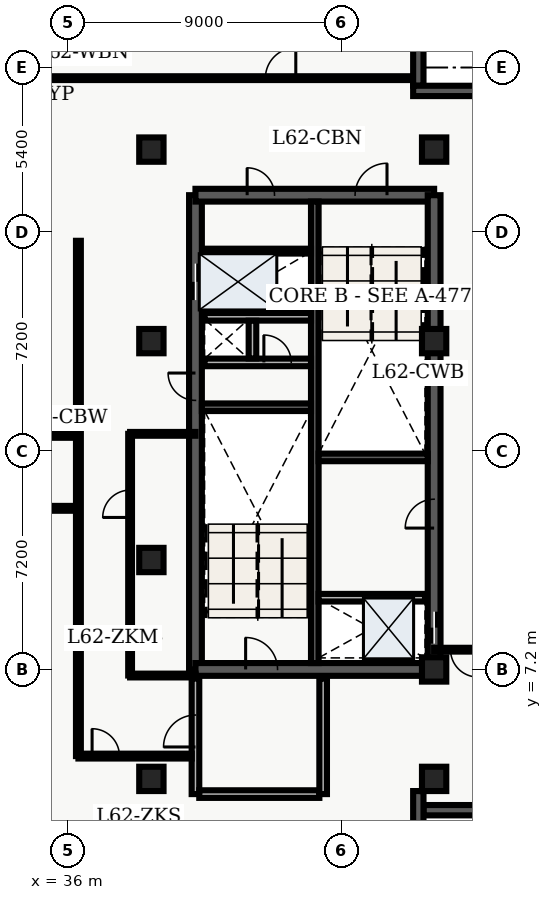
"""IFC4 building model, lengths in metres.
Left out: names, types, materials, properties, quantities, classifications, styles, units other than length and angle.
Written with IfcOpenShell. Run it as: python <this file> out.ifc"""

import sys

from ifc_helpers import new_model, entity, si_unit, converted_unit, direction, frame, origin_with_axes, origin_2d_with_axis, place, context, subcontext, project, spatial, polyline, rectangle, outline, extrude, element, fill, save


model = new_model("IFC4")
c1 = context("Model", 3, precision=1e-05, world=origin_with_axes(), true_north=direction((0.0, 1.0)))
c2 = subcontext(c1, "Body", "Model", "MODEL_VIEW")
j1 = project(units=[si_unit("LENGTHUNIT", "METRE"), converted_unit("PLANEANGLEUNIT", "DEGREE", entity("IfcPlaneAngleMeasure", 0.017), si_unit("PLANEANGLEUNIT", "RADIAN"), dimensions=[0, 0, 0, 0, 0, 0, 0])], contexts=[c1])
p1 = place(None, origin_with_axes())
s1 = spatial("IfcSite", under=j1, at=p1, CompositionType="ELEMENT")
p2 = place(p1, origin_with_axes())
s2 = spatial("IfcBuilding", under=s1, at=p2, CompositionType="ELEMENT")
p3 = place(p2, frame((0.0, 0.0, 252.9), z_axis=(0.0, 0.0, 1.0), x_axis=(1.0, 0.0, 0.0)))
s3 = spatial("IfcBuildingStorey", under=s2, at=p3, CompositionType="ELEMENT", Elevation=252.9)
p4 = place(p3, frame((40.2, 7.2, 0.0), z_axis=(0.0, 0.0, 1.0), x_axis=(0.0, 1.0, 0.0)))
e1 = element("IfcWall", 1, at=p4, inside=s3, PredefinedType="SHEAR", context=c2, shape_type="SweptSolid", body=[
    extrude(outline(polyline([(0.0, -0.21), (15.6, -0.21), (15.6, 0.21), (0.0, 0.21), (0.0, -0.21)])), origin_with_axes(), (0.0, 0.0, 1.0), 3.66),
])
p5 = place(p4, frame((12.75, 0.0, 0.0), z_axis=(0.0, 0.0, 1.0), x_axis=(1.0, 0.0, 0.0)))
e2 = element("IfcOpeningElement", 2, at=p5, cuts=e1, PredefinedType="OPENING", context=c2, shape_type="SweptSolid", body=[
    extrude(rectangle(XDim=1.2, YDim=0.44, at=origin_2d_with_axis()), origin_with_axes(), (0.0, 0.0, 1.0), 2.15),
])
p6 = place(p4, frame((9.3, 0.0, 0.0), z_axis=(0.0, 0.0, 1.0), x_axis=(1.0, 0.0, 0.0)))
e3 = element("IfcOpeningElement", 3, at=p6, cuts=e1, PredefinedType="OPENING", context=c2, shape_type="SweptSolid", body=[
    extrude(rectangle(XDim=0.9, YDim=0.44, at=origin_2d_with_axis()), origin_with_axes(), (0.0, 0.0, 1.0), 2.15),
])
p7 = place(p3, frame((40.2, 7.2, 0.0), z_axis=(0.0, 0.0, 1.0), x_axis=(1.0, 0.0, 0.0)))
e4 = element("IfcWall", 4, at=p7, inside=s3, PredefinedType="SHEAR", context=c2, shape_type="SweptSolid", body=[
    extrude(outline(polyline([(0.0, -0.21), (7.85, -0.21), (7.85, 0.21), (0.0, 0.21), (0.0, -0.21)])), origin_with_axes(), (0.0, 0.0, 1.0), 3.66),
])
p8 = place(p7, frame((2.175, 0.0, 0.0), z_axis=(0.0, 0.0, 1.0), x_axis=(1.0, 0.0, 0.0)))
e5 = element("IfcOpeningElement", 5, at=p8, cuts=e4, PredefinedType="OPENING", context=c2, shape_type="SweptSolid", body=[
    extrude(rectangle(XDim=1.05, YDim=0.44, at=origin_2d_with_axis()), origin_with_axes(), (0.0, 0.0, 1.0), 2.15),
])
p9 = place(p3, frame((40.2, 22.8, 0.0), z_axis=(0.0, 0.0, 1.0), x_axis=(1.0, 0.0, 0.0)))
e6 = element("IfcWall", 6, at=p9, inside=s3, PredefinedType="SHEAR", context=c2, shape_type="SweptSolid", body=[
    extrude(outline(polyline([(0.0, -0.21), (7.85, -0.21), (7.85, 0.21), (0.0, 0.21), (0.0, -0.21)])), origin_with_axes(), (0.0, 0.0, 1.0), 3.66),
])
p10 = place(p9, frame((5.775, 0.0, 0.0), z_axis=(0.0, 0.0, 1.0), x_axis=(1.0, 0.0, 0.0)))
e7 = element("IfcOpeningElement", 7, at=p10, cuts=e6, PredefinedType="OPENING", context=c2, shape_type="SweptSolid", body=[
    extrude(rectangle(XDim=1.05, YDim=0.44, at=origin_2d_with_axis()), origin_with_axes(), (0.0, 0.0, 1.0), 2.15),
])
p11 = place(p9, frame((2.15, 0.0, 0.0), z_axis=(0.0, 0.0, 1.0), x_axis=(1.0, 0.0, 0.0)))
e8 = element("IfcOpeningElement", 8, at=p11, cuts=e6, PredefinedType="OPENING", context=c2, shape_type="SweptSolid", body=[
    extrude(rectangle(XDim=0.9, YDim=0.44, at=origin_2d_with_axis()), origin_with_axes(), (0.0, 0.0, 1.0), 2.15),
])
p12 = place(p3, frame((48.05, 7.2, 0.0), z_axis=(0.0, 0.0, 1.0), x_axis=(0.0, 1.0, 0.0)))
e9 = element("IfcWall", 9, at=p12, inside=s3, PredefinedType="SHEAR", context=c2, shape_type="SweptSolid", body=[
    extrude(outline(polyline([(0.0, -0.21), (15.6, -0.21), (15.6, 0.21), (0.0, 0.21), (0.0, -0.21)])), origin_with_axes(), (0.0, 0.0, 1.0), 3.66),
])
p13 = place(p12, frame((1.375, 0.0, 0.0), z_axis=(0.0, 0.0, 1.0), x_axis=(1.0, 0.0, 0.0)))
e10 = element("IfcOpeningElement", 10, at=p13, cuts=e9, PredefinedType="OPENING", context=c2, shape_type="SweptSolid", body=[
    extrude(rectangle(XDim=1.05, YDim=0.44, at=origin_2d_with_axis()), origin_with_axes(), (0.0, 0.0, 1.0), 2.15),
])
p14 = place(p12, frame((5.125, 0.0, 0.0), z_axis=(0.0, 0.0, 1.0), x_axis=(1.0, 0.0, 0.0)))
e11 = element("IfcOpeningElement", 11, at=p14, cuts=e9, PredefinedType="OPENING", context=c2, shape_type="SweptSolid", body=[
    extrude(rectangle(XDim=0.95, YDim=0.44, at=origin_2d_with_axis()), origin_with_axes(), (0.0, 0.0, 1.0), 2.15),
])
p15 = place(p3, frame((44.125, 7.41, 0.0), z_axis=(0.0, 0.0, 1.0), x_axis=(0.0, 1.0, 0.0)))
e12 = element("IfcWall", 12, at=p15, inside=s3, PredefinedType="SHEAR", context=c2, shape_type="SweptSolid", body=[
    extrude(outline(polyline([(0.0, -0.125), (15.18, -0.125), (15.18, 0.125), (0.0, 0.125), (0.0, -0.125)])), origin_with_axes(), (0.0, 0.0, 1.0), 3.66),
])
for number, where, z_axis, x_axis in (
    (13, (40.41, 15.825, 0.0), (0.0, 0.0, 1.0), (1.0, 0.0, 0.0)),
    (14, (44.25, 14.175, 0.0), (0.0, 0.0, 1.0), (1.0, 0.0, 0.0)),
):
    element("IfcWall", number, at=place(p3, frame(where, z_axis=z_axis, x_axis=x_axis)), inside=s3, PredefinedType="SHEAR", context=c2, shape_type="SweptSolid", body=[
        extrude(outline(polyline([(0.0, -0.125), (3.59, -0.125), (3.59, 0.125), (0.0, 0.125), (0.0, -0.125)])), origin_with_axes(), (0.0, 0.0, 1.0), 3.66),
    ])
p16 = place(p3, frame((40.5, 17.3, 0.0), z_axis=(0.0, 0.0, 1.0), x_axis=(1.0, 0.0, 0.0)))
e15 = element("IfcWall", 15, at=p16, inside=s3, PredefinedType="SOLIDWALL", context=c2, shape_type="SweptSolid", body=[
    extrude(outline(polyline([(0.0, -0.125), (3.5, -0.125), (3.5, 0.125), (0.0, 0.125), (0.0, -0.125)])), origin_with_axes(), (0.0, 0.0, 1.0), 2.7),
])
p17 = place(p16, frame((2.4, 0.0, 0.0), z_axis=(0.0, 0.0, 1.0), x_axis=(1.0, 0.0, 0.0)))
e16 = element("IfcOpeningElement", 16, at=p17, cuts=e15, PredefinedType="OPENING", context=c2, shape_type="SweptSolid", body=[
    extrude(rectangle(XDim=0.9, YDim=0.27, at=origin_2d_with_axis()), origin_with_axes(), (0.0, 0.0, 1.0), 2.15),
])
p18 = place(p3, frame((40.5, 18.8, 0.0), z_axis=(0.0, 0.0, 1.0), x_axis=(1.0, 0.0, 0.0)))
e17 = element("IfcWall", 17, at=p18, inside=s3, PredefinedType="SOLIDWALL", context=c2, shape_type="SweptSolid", body=[
    extrude(outline(polyline([(0.0, -0.125), (3.5, -0.125), (3.5, 0.125), (0.0, 0.125), (0.0, -0.125)])), origin_with_axes(), (0.0, 0.0, 1.0), 2.7),
])
p19 = place(p3, frame((42.075, 17.43, 0.0), z_axis=(0.0, 0.0, 1.0), x_axis=(0.0, 1.0, 0.0)))
e18 = element("IfcWall", 18, at=p19, inside=s3, PredefinedType="SOLIDWALL", context=c2, shape_type="SweptSolid", body=[
    extrude(outline(polyline([(0.0, -0.125), (1.24, -0.125), (1.24, 0.125), (0.0, 0.125), (0.0, -0.125)])), origin_with_axes(), (0.0, 0.0, 1.0), 2.7),
])
p20 = place(p3, frame((40.2, 3.1, 0.0), z_axis=(0.0, 0.0, 1.0), x_axis=(0.0, 1.0, 0.0)))
e19 = element("IfcWall", 19, at=p20, inside=s3, PredefinedType="SOLIDWALL", context=c2, shape_type="SweptSolid", body=[
    extrude(outline(polyline([(0.0, -0.125), (3.8, -0.125), (3.8, 0.125), (0.0, 0.125), (0.0, -0.125)])), origin_with_axes(), (0.0, 0.0, 1.0), 2.7),
])
p21 = place(p20, frame((2.075, 0.0, 0.0), z_axis=(0.0, 0.0, 1.0), x_axis=(1.0, 0.0, 0.0)))
e20 = element("IfcOpeningElement", 20, at=p21, cuts=e19, PredefinedType="OPENING", context=c2, shape_type="SweptSolid", body=[
    extrude(rectangle(XDim=1.05, YDim=0.27, at=origin_2d_with_axis()), origin_with_axes(), (0.0, 0.0, 1.0), 2.15),
])
p22 = place(p3, frame((40.325, 3.1, 0.0), z_axis=(0.0, 0.0, 1.0), x_axis=(1.0, 0.0, 0.0)))
e21 = element("IfcWall", 21, at=p22, inside=s3, PredefinedType="SOLIDWALL", context=c2, shape_type="SweptSolid", body=[
    extrude(outline(polyline([(0.0, -0.125), (3.95, -0.125), (3.95, 0.125), (0.0, 0.125), (0.0, -0.125)])), origin_with_axes(), (0.0, 0.0, 1.0), 2.7),
])
p23 = place(p3, frame((44.4, 3.1, 0.0), z_axis=(0.0, 0.0, 1.0), x_axis=(0.0, 1.0, 0.0)))
e22 = element("IfcWall", 22, at=p23, inside=s3, PredefinedType="SOLIDWALL", context=c2, shape_type="SweptSolid", body=[
    extrude(outline(polyline([(0.0, -0.125), (3.8, -0.125), (3.8, 0.125), (0.0, 0.125), (0.0, -0.125)])), origin_with_axes(), (0.0, 0.0, 1.0), 2.7),
])
for number, where, z_axis, x_axis in (
    (23, (38.75, 3.6, 0.0), (0.0, 0.0, 1.0), (1.0, 0.0, 0.0)),
    (24, (38.75, 10.8, 0.0), (0.0, 0.0, 1.0), (1.0, 0.0, 0.0)),
    (25, (38.75, 18.0, 0.0), (0.0, 0.0, 1.0), (1.0, 0.0, 0.0)),
    (26, (38.75, 24.3, 0.0), (0.0, 0.0, 1.0), (1.0, 0.0, 0.0)),
    (27, (48.05, 3.6, 0.0), (0.0, 0.0, 1.0), (1.0, 0.0, 0.0)),
    (28, (48.05, 7.2, 0.0), (0.0, 0.0, 1.0), (1.0, 0.0, 0.0)),
    (29, (48.05, 18.0, 0.0), (0.0, 0.0, 1.0), (1.0, 0.0, 0.0)),
    (30, (48.05, 24.3, 0.0), (0.0, 0.0, 1.0), (1.0, 0.0, 0.0)),
):
    element("IfcColumn", number, at=place(p3, frame(where, z_axis=z_axis, x_axis=x_axis)), inside=s3, PredefinedType="COLUMN", context=c2, shape_type="SweptSolid", body=[
        extrude(rectangle(XDim=0.8, YDim=0.8, at=origin_2d_with_axis()), origin_with_axes(), (0.0, 0.0, 1.0), 3.9),
    ])
p24 = place(p3, frame((40.5, 20.96, 0.0), z_axis=(0.0, 0.0, 1.0), x_axis=(1.0, 0.0, 0.0)))
e31 = element("IfcWall", 31, at=p24, inside=s3, PredefinedType="PARTITIONING", context=c2, shape_type="SweptSolid", body=[
    extrude(outline(polyline([(0.0, -0.08), (3.5, -0.08), (3.5, 0.08), (0.0, 0.08), (0.0, -0.08)])), origin_with_axes(), (0.0, 0.0, 1.0), 2.7),
])
p25 = place(p3, frame((44.25, 9.56, 0.0), z_axis=(0.0, 0.0, 1.0), x_axis=(1.0, 0.0, 0.0)))
e32 = element("IfcWall", 32, at=p25, inside=s3, PredefinedType="SOLIDWALL", context=c2, shape_type="SweptSolid", body=[
    extrude(outline(polyline([(0.0, -0.125), (3.5, -0.125), (3.5, 0.125), (0.0, 0.125), (0.0, -0.125)])), origin_with_axes(), (0.0, 0.0, 1.0), 2.7),
])
p26 = place(p3, frame((20.3, 12.5, 0.0), z_axis=(0.0, 0.0, 1.0), x_axis=(1.0, 0.0, 0.0)))
e33 = element("IfcWall", 33, at=p26, inside=s3, PredefinedType="PARTITIONING", context=c2, shape_type="SweptSolid", body=[
    extrude(outline(polyline([(0.0, -0.08), (16.05, -0.08), (16.05, 0.08), (0.0, 0.08), (0.0, -0.08)])), origin_with_axes(), (0.0, 0.0, 1.0), 2.7),
])
p27 = place(p26, frame((3.662, 0.0, 0.0), z_axis=(0.0, 0.0, 1.0), x_axis=(1.0, 0.0, 0.0)))
e34 = element("IfcOpeningElement", 34, at=p27, cuts=e33, PredefinedType="OPENING", context=c2, shape_type="SweptSolid", body=[
    extrude(rectangle(XDim=1.0, YDim=0.18, at=origin_2d_with_axis()), origin_with_axes(), (0.0, 0.0, 1.0), 2.15),
])
p28 = place(p26, frame((11.557, 0.0, 0.0), z_axis=(0.0, 0.0, 1.0), x_axis=(1.0, 0.0, 0.0)))
e35 = element("IfcOpeningElement", 35, at=p28, cuts=e33, PredefinedType="OPENING", context=c2, shape_type="SweptSolid", body=[
    extrude(rectangle(XDim=1.0, YDim=0.18, at=origin_2d_with_axis()), origin_with_axes(), (0.0, 0.0, 1.0), 2.15),
])
p29 = place(p3, frame((20.3, 14.9, 0.0), z_axis=(0.0, 0.0, 1.0), x_axis=(1.0, 0.0, 0.0)))
e36 = element("IfcWall", 36, at=p29, inside=s3, PredefinedType="PARTITIONING", context=c2, shape_type="SweptSolid", body=[
    extrude(outline(polyline([(0.0, -0.08), (16.05, -0.08), (16.05, 0.08), (0.0, 0.08), (0.0, -0.08)])), origin_with_axes(), (0.0, 0.0, 1.0), 2.7),
])
p30 = place(p29, frame((3.759, 0.0, 0.0), z_axis=(0.0, 0.0, 1.0), x_axis=(1.0, 0.0, 0.0)))
e37 = element("IfcOpeningElement", 37, at=p30, cuts=e36, PredefinedType="OPENING", context=c2, shape_type="SweptSolid", body=[
    extrude(rectangle(XDim=1.0, YDim=0.18, at=origin_2d_with_axis()), origin_with_axes(), (0.0, 0.0, 1.0), 2.15),
])
p31 = place(p29, frame((11.654, 0.0, 0.0), z_axis=(0.0, 0.0, 1.0), x_axis=(1.0, 0.0, 0.0)))
e38 = element("IfcOpeningElement", 38, at=p31, cuts=e36, PredefinedType="OPENING", context=c2, shape_type="SweptSolid", body=[
    extrude(rectangle(XDim=1.0, YDim=0.18, at=origin_2d_with_axis()), origin_with_axes(), (0.0, 0.0, 1.0), 2.15),
])
p32 = place(p3, frame((36.35, 4.35, 0.0), z_axis=(0.0, 0.0, 1.0), x_axis=(0.0, 1.0, 0.0)))
e39 = element("IfcWall", 39, at=p32, inside=s3, PredefinedType="PARTITIONING", context=c2, shape_type="SweptSolid", body=[
    extrude(outline(polyline([(0.0, -0.08), (16.95, -0.08), (16.95, 0.08), (0.0, 0.08), (0.0, -0.08)])), origin_with_axes(), (0.0, 0.0, 1.0), 2.7),
])
p33 = place(p3, frame((49.765, 7.85, 0.0), z_axis=(0.0, 0.0, 1.0), x_axis=(-1.0, 0.0, 0.0)))
e40 = element("IfcWall", 40, at=p33, inside=s3, PredefinedType="PARTITIONING", context=c2, shape_type="SweptSolid", body=[
    extrude(outline(polyline([(0.0, -0.062), (1.715, -0.062), (1.715, 0.062), (0.0, 0.062), (0.0, -0.062)])), origin_with_axes(), (0.0, 0.0, 1.0), 2.7),
])
p34 = place(p33, frame((0.725, 0.0, 0.0), z_axis=(0.0, 0.0, 1.0), x_axis=(1.0, 0.0, 0.0)))
e41 = element("IfcOpeningElement", 41, at=p34, cuts=e40, PredefinedType="OPENING", context=c2, shape_type="SweptSolid", body=[
    extrude(rectangle(XDim=0.9, YDim=0.145, at=origin_2d_with_axis()), origin_with_axes(), (0.0, 0.0, 1.0), 2.15),
])
p35 = place(p3, frame((34.535, 26.65, 0.0), z_axis=(0.0, 0.0, 1.0), x_axis=(1.0, 0.0, 0.0)))
e42 = element("IfcWall", 42, at=p35, inside=s3, PredefinedType="PARTITIONING", context=c2, shape_type="SweptSolid", body=[
    extrude(outline(polyline([(0.0, -0.062), (12.995, -0.062), (12.995, 0.062), (0.0, 0.062), (0.0, -0.062)])), origin_with_axes(), (0.0, 0.0, 1.0), 2.7),
])
p36 = place(p35, frame((8.465, 0.0, 0.0), z_axis=(0.0, 0.0, 1.0), x_axis=(1.0, 0.0, 0.0)))
e43 = element("IfcOpeningElement", 43, at=p36, cuts=e42, PredefinedType="OPENING", context=c2, shape_type="SweptSolid", body=[
    extrude(rectangle(XDim=1.0, YDim=0.145, at=origin_2d_with_axis()), origin_with_axes(), (0.0, 0.0, 1.0), 2.15),
])
p37 = place(p3, frame((36.35, 4.35, 0.0), z_axis=(0.0, 0.0, 1.0), x_axis=(1.0, 0.0, 0.0)))
e44 = element("IfcWall", 44, at=p37, inside=s3, PredefinedType="PARTITIONING", context=c2, shape_type="SweptSolid", body=[
    extrude(outline(polyline([(0.0, -0.08), (3.725, -0.08), (3.725, 0.08), (0.0, 0.08), (0.0, -0.08)])), origin_with_axes(), (0.0, 0.0, 1.0), 2.7),
])
p38 = place(p37, frame((0.9, 0.0, 0.0), z_axis=(0.0, 0.0, 1.0), x_axis=(1.0, 0.0, 0.0)))
e45 = element("IfcOpeningElement", 45, at=p38, cuts=e44, PredefinedType="OPENING", context=c2, shape_type="SweptSolid", body=[
    extrude(rectangle(XDim=0.9, YDim=0.18, at=origin_2d_with_axis()), origin_with_axes(), (0.0, 0.0, 1.0), 2.15),
])
for number, where, z_axis, x_axis in (
    (46, (38.05, 7.0, 0.0), (0.0, 0.0, 1.0), (1.0, 0.0, 0.0)),
    (47, (38.05, 14.95, 0.0), (0.0, 0.0, 1.0), (1.0, 0.0, 0.0)),
):
    element("IfcWall", number, at=place(p3, frame(where, z_axis=z_axis, x_axis=x_axis)), inside=s3, PredefinedType="PARTITIONING", context=c2, shape_type="SweptSolid", body=[
        extrude(outline(polyline([(0.0, -0.062), (2.15, -0.062), (2.15, 0.062), (0.0, 0.062), (0.0, -0.062)])), origin_with_axes(), (0.0, 0.0, 1.0), 2.7),
    ])
p39 = place(p3, frame((38.05, 7.0, 0.0), z_axis=(0.0, 0.0, 1.0), x_axis=(0.0, 1.0, 0.0)))
e48 = element("IfcWall", 48, at=p39, inside=s3, PredefinedType="PARTITIONING", context=c2, shape_type="SweptSolid", body=[
    extrude(outline(polyline([(0.0, -0.062), (7.95, -0.062), (7.95, 0.062), (0.0, 0.062), (0.0, -0.062)])), origin_with_axes(), (0.0, 0.0, 1.0), 2.7),
])
p40 = place(p39, frame((5.65, 0.0, 0.0), z_axis=(0.0, 0.0, 1.0), x_axis=(1.0, 0.0, 0.0)))
e49 = element("IfcOpeningElement", 49, at=p40, cuts=e48, PredefinedType="OPENING", context=c2, shape_type="SweptSolid", body=[
    extrude(rectangle(XDim=0.9, YDim=0.145, at=origin_2d_with_axis()), origin_with_axes(), (0.0, 0.0, 1.0), 2.15),
])
p41 = place(p3, frame((47.53, 28.46, 0.0), z_axis=(0.0, 0.0, 1.0), x_axis=(0.0, -1.0, 0.0)))
e50 = element("IfcWall", 50, at=p41, inside=s3, PredefinedType="SOLIDWALL", context=c2, shape_type="SweptSolid", body=[
    extrude(outline(polyline([(0.0, -0.17), (2.06, -0.17), (2.06, 0.17), (0.0, 0.17), (0.0, -0.17)])), origin_with_axes(), (0.0, 0.0, 1.0), 3.66),
])
p42 = place(p3, frame((47.36, 26.23, 0.0), z_axis=(0.0, 0.0, 1.0), x_axis=(1.0, 0.0, 0.0)))
e51 = element("IfcWall", 51, at=p42, inside=s3, PredefinedType="SOLIDWALL", context=c2, shape_type="SweptSolid", body=[
    extrude(outline(polyline([(0.0, -0.17), (2.74, -0.17), (2.74, 0.17), (0.0, 0.17), (0.0, -0.17)])), origin_with_axes(), (0.0, 0.0, 1.0), 3.66),
])
p43 = place(p3, frame((49.76, 2.57, 0.0), z_axis=(0.0, 0.0, 1.0), x_axis=(-1.0, 0.0, 0.0)))
e52 = element("IfcWall", 52, at=p43, inside=s3, PredefinedType="SOLIDWALL", context=c2, shape_type="SweptSolid", body=[
    extrude(outline(polyline([(0.0, -0.17), (2.06, -0.17), (2.06, 0.17), (0.0, 0.17), (0.0, -0.17)])), origin_with_axes(), (0.0, 0.0, 1.0), 3.66),
])
p44 = place(p3, frame((47.53, 3.2, 0.0), z_axis=(0.0, 0.0, 1.0), x_axis=(0.0, -1.0, 0.0)))
e53 = element("IfcWall", 53, at=p44, inside=s3, PredefinedType="SOLIDWALL", context=c2, shape_type="SweptSolid", body=[
    extrude(outline(polyline([(0.0, -0.17), (3.2, -0.17), (3.2, 0.17), (0.0, 0.17), (0.0, -0.17)])), origin_with_axes(), (0.0, 0.0, 1.0), 3.66),
])
p45 = place(p12, frame((1.375, 0.0, 0.0), z_axis=(0.0, 0.0, 1.0), x_axis=(1.0, 0.0, 0.0)))
e54 = element("IfcDoor", 54, at=p45, inside=s3, OperationType="SLIDING_TO_LEFT", PredefinedType="DOOR", context=c2, shape_type="SweptSolid", body=[
    extrude(rectangle(XDim=1.05, YDim=0.09, at=origin_2d_with_axis()), origin_with_axes(), (0.0, 0.0, 1.0), 2.15),
])
fill(e10, e54)
p46 = place(p4, frame((12.75, 0.0, 0.0), z_axis=(0.0, 0.0, 1.0), x_axis=(1.0, 0.0, 0.0)))
e55 = element("IfcDoor", 55, at=p46, inside=s3, OperationType="DOUBLE_DOOR_SLIDING", PredefinedType="DOOR", context=c2, shape_type="SweptSolid", body=[
    extrude(rectangle(XDim=1.2, YDim=0.09, at=origin_2d_with_axis()), origin_with_axes(), (0.0, 0.0, 1.0), 2.15),
])
fill(e2, e55)
p47 = place(p4, frame((9.3, 0.0, 0.0), z_axis=(0.0, 0.0, 1.0), x_axis=(1.0, 0.0, 0.0)))
e56 = element("IfcDoor", 56, at=p47, inside=s3, OperationType="SINGLE_SWING_RIGHT", PredefinedType="DOOR", context=c2, shape_type="SweptSolid", body=[
    extrude(rectangle(XDim=0.9, YDim=0.09, at=origin_2d_with_axis()), origin_with_axes(), (0.0, 0.0, 1.0), 2.15),
])
fill(e3, e56)
p48 = place(p16, frame((2.4, 0.0, 0.0), z_axis=(0.0, 0.0, 1.0), x_axis=(1.0, 0.0, 0.0)))
e57 = element("IfcDoor", 57, at=p48, inside=s3, OperationType="SINGLE_SWING_LEFT", PredefinedType="DOOR", context=c2, shape_type="SweptSolid", body=[
    extrude(rectangle(XDim=0.9, YDim=0.09, at=origin_2d_with_axis()), origin_with_axes(), (0.0, 0.0, 1.0), 2.15),
])
fill(e16, e57)
p49 = place(p7, frame((2.175, 0.0, 0.0), z_axis=(0.0, 0.0, 1.0), x_axis=(1.0, 0.0, 0.0)))
e58 = element("IfcDoor", 58, at=p49, inside=s3, OperationType="SINGLE_SWING_LEFT", PredefinedType="DOOR", context=c2, shape_type="SweptSolid", body=[
    extrude(rectangle(XDim=1.05, YDim=0.09, at=origin_2d_with_axis()), origin_with_axes(), (0.0, 0.0, 1.0), 2.15),
])
fill(e5, e58)
p50 = place(p9, frame((5.775, 0.0, 0.0), z_axis=(0.0, 0.0, 1.0), x_axis=(1.0, 0.0, 0.0)))
e59 = element("IfcDoor", 59, at=p50, inside=s3, OperationType="SINGLE_SWING_RIGHT", PredefinedType="DOOR", context=c2, shape_type="SweptSolid", body=[
    extrude(rectangle(XDim=1.05, YDim=0.09, at=origin_2d_with_axis()), origin_with_axes(), (0.0, 0.0, 1.0), 2.15),
])
fill(e7, e59)
p51 = place(p20, frame((2.075, 0.0, 0.0), z_axis=(0.0, 0.0, 1.0), x_axis=(1.0, 0.0, 0.0)))
e60 = element("IfcDoor", 60, at=p51, inside=s3, OperationType="SINGLE_SWING_LEFT", PredefinedType="DOOR", context=c2, shape_type="SweptSolid", body=[
    extrude(rectangle(XDim=1.05, YDim=0.09, at=origin_2d_with_axis()), origin_with_axes(), (0.0, 0.0, 1.0), 2.15),
])
fill(e20, e60)
p52 = place(p9, frame((2.15, 0.0, 0.0), z_axis=(0.0, 0.0, 1.0), x_axis=(1.0, 0.0, 0.0)))
e61 = element("IfcDoor", 61, at=p52, inside=s3, OperationType="SINGLE_SWING_LEFT", PredefinedType="DOOR", context=c2, shape_type="SweptSolid", body=[
    extrude(rectangle(XDim=0.9, YDim=0.09, at=origin_2d_with_axis()), origin_with_axes(), (0.0, 0.0, 1.0), 2.15),
])
fill(e8, e61)
p53 = place(p12, frame((5.125, 0.0, 0.0), z_axis=(0.0, 0.0, 1.0), x_axis=(1.0, 0.0, 0.0)))
e62 = element("IfcDoor", 62, at=p53, inside=s3, OperationType="SINGLE_SWING_LEFT", PredefinedType="DOOR", context=c2, shape_type="SweptSolid", body=[
    extrude(rectangle(XDim=0.95, YDim=0.09, at=origin_2d_with_axis()), origin_with_axes(), (0.0, 0.0, 1.0), 2.15),
])
fill(e11, e62)
p54 = place(p33, frame((0.725, 0.0, 0.0), z_axis=(0.0, 0.0, 1.0), x_axis=(1.0, 0.0, 0.0)))
e63 = element("IfcDoor", 63, at=p54, inside=s3, OperationType="SINGLE_SWING_LEFT", PredefinedType="DOOR", context=c2, shape_type="SweptSolid", body=[
    extrude(rectangle(XDim=0.9, YDim=0.075, at=origin_2d_with_axis()), origin_with_axes(), (0.0, 0.0, 1.0), 2.15),
])
fill(e41, e63)
p55 = place(p35, frame((8.465, 0.0, 0.0), z_axis=(0.0, 0.0, 1.0), x_axis=(1.0, 0.0, 0.0)))
e64 = element("IfcDoor", 64, at=p55, inside=s3, OperationType="SINGLE_SWING_RIGHT", PredefinedType="DOOR", context=c2, shape_type="SweptSolid", body=[
    extrude(rectangle(XDim=1.0, YDim=0.075, at=origin_2d_with_axis()), origin_with_axes(), (0.0, 0.0, 1.0), 2.15),
])
fill(e43, e64)
p56 = place(p37, frame((0.9, 0.0, 0.0), z_axis=(0.0, 0.0, 1.0), x_axis=(1.0, 0.0, 0.0)))
e65 = element("IfcDoor", 65, at=p56, inside=s3, OperationType="SINGLE_SWING_LEFT", PredefinedType="DOOR", context=c2, shape_type="SweptSolid", body=[
    extrude(rectangle(XDim=0.9, YDim=0.09, at=origin_2d_with_axis()), origin_with_axes(), (0.0, 0.0, 1.0), 2.15),
])
fill(e45, e65)
p57 = place(p39, frame((5.65, 0.0, 0.0), z_axis=(0.0, 0.0, 1.0), x_axis=(1.0, 0.0, 0.0)))
e66 = element("IfcDoor", 66, at=p57, inside=s3, OperationType="SINGLE_SWING_LEFT", PredefinedType="DOOR", context=c2, shape_type="SweptSolid", body=[
    extrude(rectangle(XDim=0.9, YDim=0.075, at=origin_2d_with_axis()), origin_with_axes(), (0.0, 0.0, 1.0), 2.15),
])
fill(e49, e66)
save(model, sys.argv[1])
